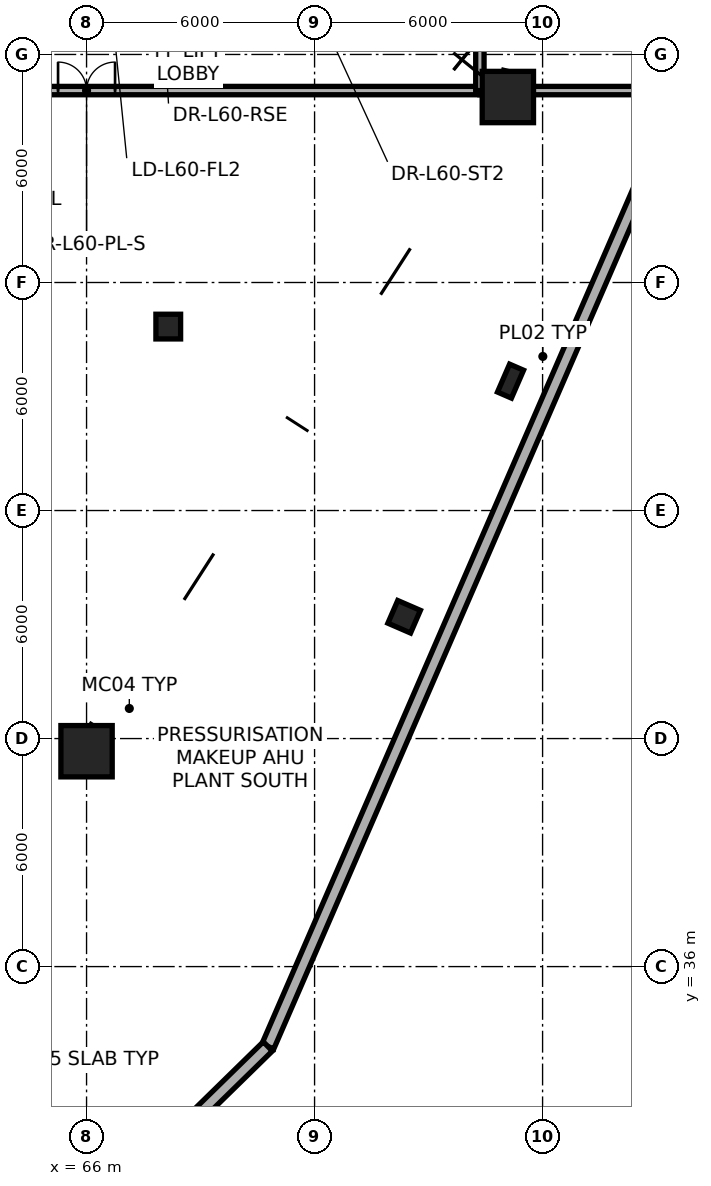
"""IFC4 building model, lengths in metres.
Left out: names, types, materials, properties, quantities, classifications, styles, units other than length and angle.
Written with IfcOpenShell. Run it as: python <this file> out.ifc"""

import sys

from ifc_helpers import new_model, si_unit, direction, frame, frame_2d, origin, origin_2d, place, context, subcontext, project, spatial, rectangle, extrude, element, fill, save


model = new_model("IFC4")
c1 = context("Model", 3, precision=1e-05, world=origin(), true_north=direction((0.0, 1.0)))
c2 = subcontext(c1, "Body", "Model", "MODEL_VIEW")
j1 = project(units=[si_unit("LENGTHUNIT", "METRE"), si_unit("PLANEANGLEUNIT", "RADIAN")], contexts=[c1])
p1 = place(None, origin())
s1 = spatial("IfcSite", under=j1, at=p1, CompositionType="ELEMENT")
p2 = place(p1, origin())
s2 = spatial("IfcBuilding", under=s1, at=p2, CompositionType="ELEMENT")
p3 = place(p2, frame((0.0, 0.0, 227.4)))
s3 = spatial("IfcBuildingStorey", under=s2, at=p3, CompositionType="ELEMENT", Elevation=227.4)
p4 = place(p3, frame((68.15, 52.84, 0.0), z_axis=(0.0, 0.0, 1.0), x_axis=(1.0, 0.0, 0.0)))
e1 = element("IfcColumn", 1, at=p4, inside=s3, PredefinedType="COLUMN", context=c2, shape_type="SweptSolid", body=[
    extrude(rectangle(XDim=0.65, YDim=0.65, at=origin_2d()), origin(), (0.0, 0.0, 1.0), 4.2),
])
for number, where, z_axis, x_axis in (
    (2, (66.0, 41.667, 0.0), (0.0, 0.0, 1.0), (1.0, 0.0, 0.0)),
    (3, (77.086, 58.88, 0.0), (0.0, 0.0, 1.0), (1.0, 0.0, 0.0)),
):
    element("IfcColumn", number, at=place(p3, frame(where, z_axis=z_axis, x_axis=x_axis)), inside=s3, PredefinedType="COLUMN", context=c2, shape_type="SweptSolid", body=[
        extrude(rectangle(XDim=1.35, YDim=1.35, at=origin_2d()), origin(), (0.0, 0.0, 1.0), 4.2),
    ])
p5 = place(p3, frame((74.38, 45.105, 0.003), z_axis=(-0.010756866021, 0.047388355714, 0.998818618957), x_axis=(-0.185407903255, -0.981650038099, 0.044577035682)))
e4 = element("IfcColumn", 4, at=p5, inside=s3, PredefinedType="COLUMN", context=c2, shape_type="SweptSolid", body=[
    extrude(rectangle(XDim=0.65, YDim=0.65, at=origin_2d()), origin(), (0.0, 0.0, 1.0), 4.199),
])
p6 = place(p3, frame((77.192, 51.335, 0.003), z_axis=(-0.017044742667, 0.033333233953, 0.999298940389), x_axis=(0.062892262064, -0.997429235793, 0.034343601403)))
e5 = element("IfcColumn", 5, at=p6, inside=s3, PredefinedType="PILASTER", context=c2, shape_type="SweptSolid", body=[
    extrude(rectangle(XDim=0.8, YDim=0.4, at=origin_2d()), origin(), (0.0, 0.0, 1.0), 4.197),
])
p7 = place(p3, frame((90.205, 78.681, 0.0), z_axis=(0.0, 0.0, 1.0), x_axis=(-0.398111937444, -0.917336843948, 0.0)))
e6 = element("IfcWall", 6, at=p7, inside=s3, PredefinedType="STANDARD", context=c2, shape_type="SweptSolid", body=[
    extrude(rectangle(XDim=48.817, YDim=0.34, at=frame_2d((24.408, 0.0))), origin(), (0.0, 0.0, 1.0), 0.85),
])
p8 = place(p3, frame((70.77, 33.9, 0.0), z_axis=(0.0, 0.0, 1.0), x_axis=(-0.714959697892, -0.699165667342, 0.0)))
e7 = element("IfcWall", 7, at=p8, inside=s3, PredefinedType="STANDARD", context=c2, shape_type="SweptSolid", body=[
    extrude(rectangle(XDim=3.926, YDim=0.34, at=frame_2d((1.963, 0.0))), origin(), (0.0, 0.0, 1.0), 3.95),
])
p9 = place(p3, frame((76.35, 59.05, 0.0), z_axis=(0.0, 0.0, 1.0), x_axis=(1.0, 0.0, 0.0)))
e8 = element("IfcWall", 8, at=p9, inside=s3, PredefinedType="PARTITIONING", context=c2, shape_type="SweptSolid", body=[
    extrude(rectangle(XDim=5.242, YDim=0.22, at=frame_2d((2.621, 0.0))), origin(), (0.0, 0.0, 1.0), 3.15),
])
p10 = place(p3, frame((55.65, 59.05, 0.0), z_axis=(0.0, 0.0, 1.0), x_axis=(1.0, 0.0, 0.0)))
e9 = element("IfcWall", 9, at=p10, inside=s3, PredefinedType="PARTITIONING", context=c2, shape_type="SweptSolid", body=[
    extrude(rectangle(XDim=20.7, YDim=0.22, at=frame_2d((10.35, 0.0))), origin(), (0.0, 0.0, 1.0), 3.38),
])
p11 = place(p10, frame((9.6, 0.0, 0.0)))
e10 = element("IfcOpeningElement", 10, at=p11, cuts=e9, PredefinedType="OPENING", context=c2, shape_type="SweptSolid", body=[
    extrude(rectangle(XDim=1.5, YDim=2.2, at=frame_2d((0.75, 1.1))), frame((0.0, 0.12, 0.0), z_axis=(0.0, -1.0, 0.0), x_axis=(1.0, 0.0, 0.0)), (0.0, 0.0, 1.0), 0.24),
])
p12 = place(p3, frame((76.35, 59.05, 0.0), z_axis=(0.0, 0.0, 1.0), x_axis=(0.0, 1.0, 0.0)))
e11 = element("IfcWall", 11, at=p12, inside=s3, PredefinedType="PARTITIONING", context=c2, shape_type="SweptSolid", body=[
    extrude(rectangle(XDim=17.9, YDim=0.22, at=frame_2d((8.95, 0.0))), origin(), (0.0, 0.0, 1.0), 3.38),
])
p13 = place(p12, frame((7.265, 0.0, 0.0)))
e12 = element("IfcOpeningElement", 12, at=p13, cuts=e11, PredefinedType="OPENING", context=c2, shape_type="SweptSolid", body=[
    extrude(rectangle(XDim=1.05, YDim=2.15, at=frame_2d((0.525, 1.075))), frame((0.0, 0.12, 0.0), z_axis=(0.0, -1.0, 0.0), x_axis=(1.0, 0.0, 0.0)), (0.0, 0.0, 1.0), 0.24),
])
p14 = place(p12, frame((14.0, 0.0, 0.0)))
e13 = element("IfcOpeningElement", 13, at=p14, cuts=e11, PredefinedType="OPENING", context=c2, shape_type="SweptSolid", body=[
    extrude(rectangle(XDim=1.05, YDim=2.15, at=frame_2d((0.525, 1.075))), frame((0.0, 0.12, 0.0), z_axis=(0.0, -1.0, 0.0), x_axis=(1.0, 0.0, 0.0)), (0.0, 0.0, 1.0), 0.24),
])
p15 = place(p11, origin())
e14 = element("IfcDoor", 14, at=p15, inside=s3, OperationType="DOUBLE_DOOR_SINGLE_SWING", PredefinedType="DOOR", context=c2, shape_type="SweptSolid", body=[
    extrude(rectangle(XDim=1.5, YDim=2.2, at=frame_2d((0.75, 1.1))), frame((0.0, 0.025, 0.0), z_axis=(0.0, -1.0, 0.0), x_axis=(1.0, 0.0, 0.0)), (0.0, 0.0, 1.0), 0.05),
])
fill(e10, e14)
save(model, sys.argv[1])
